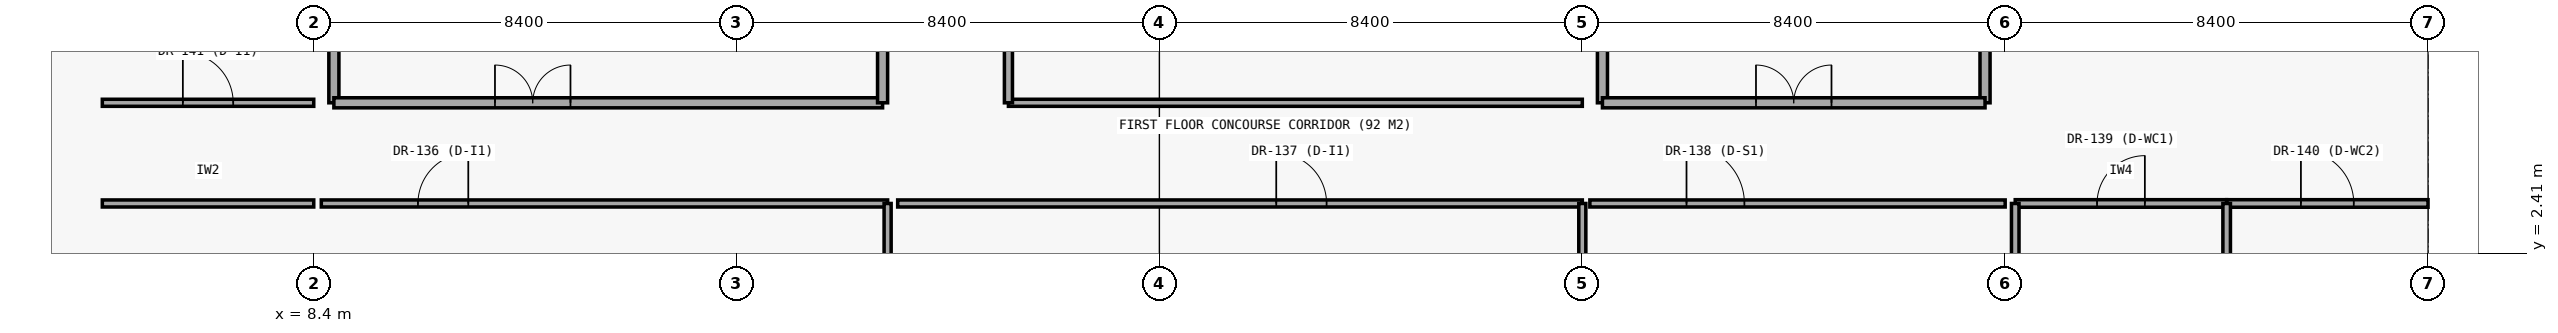
"""IFC4 building model, lengths in metres.
Left out: names, types, materials, properties, quantities, classifications, styles, units other than length and angle.
Written with IfcOpenShell. Run it as: python <this file> out.ifc"""

import sys

from ifc_helpers import new_model, si_unit, direction, frame, frame_2d, origin, place, context, subcontext, project, spatial, rectangle, extrude, element, fill, save


model = new_model("IFC4")
c1 = context("Model", 3, precision=1e-05, world=origin(), true_north=direction((0.0, 1.0)))
c2 = subcontext(c1, "Body", "Model", "MODEL_VIEW")
j1 = project(units=[si_unit("LENGTHUNIT", "METRE"), si_unit("PLANEANGLEUNIT", "RADIAN")], contexts=[c1])
p1 = place(None, origin())
s1 = spatial("IfcSite", under=j1, at=p1, CompositionType="ELEMENT")
p2 = place(p1, origin())
s2 = spatial("IfcBuilding", under=s1, at=p2, CompositionType="ELEMENT")
p3 = place(p2, frame((0.0, 0.0, 4.8)))
s3 = spatial("IfcBuildingStorey", under=s2, at=p3, CompositionType="ELEMENT", Elevation=4.8)
p4 = place(p3, frame((0.0, 4.2, 0.0), z_axis=(0.0, 0.0, 1.0), x_axis=(0.707106781187, -0.707106781187, 0.0)))
e1 = element("IfcWall", 1, at=p4, inside=s3, PredefinedType="STANDARD", context=c2, shape_type="SweptSolid", body=[
    extrude(rectangle(XDim=5.94, YDim=0.36, at=frame_2d((2.97, 0.0))), origin(), (0.0, 0.0, 1.0), 3.62),
])
p5 = place(p4, frame((2.5, 0.0, 1.0)))
e2 = element("IfcOpeningElement", 2, at=p5, cuts=e1, PredefinedType="OPENING", context=c2, shape_type="SweptSolid", body=[
    extrude(rectangle(XDim=0.75, YDim=1.5, at=frame_2d((0.375, 0.75))), frame((0.0, 0.19, 0.0), z_axis=(0.0, -1.0, 0.0), x_axis=(1.0, 0.0, 0.0)), (0.0, 0.0, 1.0), 0.38),
])
p6 = place(p3, frame((8.8, 5.4, 0.0), z_axis=(0.0, 0.0, 1.0), x_axis=(0.0, 1.0, 0.0)))
e3 = element("IfcWall", 3, at=p6, inside=s3, PredefinedType="PARTITIONING", context=c2, shape_type="SweptSolid", body=[
    extrude(rectangle(XDim=2.85, YDim=0.2, at=frame_2d((1.425, 0.0))), origin(), (0.0, 0.0, 1.0), 3.52),
])
p7 = place(p3, frame((8.8, 5.4, 0.0), z_axis=(0.0, 0.0, 1.0), x_axis=(1.0, 0.0, 0.0)))
e4 = element("IfcWall", 4, at=p7, inside=s3, PredefinedType="PARTITIONING", context=c2, shape_type="SweptSolid", body=[
    extrude(rectangle(XDim=10.9, YDim=0.2, at=frame_2d((5.45, 0.0))), origin(), (0.0, 0.0, 1.0), 3.52),
])
p8 = place(p7, frame((3.2, 0.0, 0.0)))
e5 = element("IfcOpeningElement", 5, at=p8, cuts=e4, PredefinedType="OPENING", context=c2, shape_type="SweptSolid", body=[
    extrude(rectangle(XDim=1.5, YDim=2.2, at=frame_2d((0.75, 1.1))), frame((0.0, 0.11, 0.0), z_axis=(0.0, -1.0, 0.0), x_axis=(1.0, 0.0, 0.0)), (0.0, 0.0, 1.0), 0.22),
])
p9 = place(p3, frame((19.7, 5.4, 0.0), z_axis=(0.0, 0.0, 1.0), x_axis=(0.0, 1.0, 0.0)))
e6 = element("IfcWall", 6, at=p9, inside=s3, PredefinedType="PARTITIONING", context=c2, shape_type="SweptSolid", body=[
    extrude(rectangle(XDim=9.6, YDim=0.2, at=frame_2d((4.8, 0.0))), origin(), (0.0, 0.0, 1.0), 3.52),
])
for number, where, z_axis, x_axis in (
    (7, (34.0, 5.4, 0.0), (0.0, 0.0, 1.0), (0.0, 1.0, 0.0)),
    (8, (41.6, 5.4, 0.0), (0.0, 0.0, 1.0), (0.0, 1.0, 0.0)),
):
    element("IfcWall", number, at=place(p3, frame(where, z_axis=z_axis, x_axis=x_axis)), inside=s3, PredefinedType="PARTITIONING", context=c2, shape_type="SweptSolid", body=[
        extrude(rectangle(XDim=2.85, YDim=0.2, at=frame_2d((1.425, 0.0))), origin(), (0.0, 0.0, 1.0), 3.49),
    ])
p10 = place(p3, frame((34.0, 5.4, 0.0), z_axis=(0.0, 0.0, 1.0), x_axis=(1.0, 0.0, 0.0)))
e9 = element("IfcWall", 9, at=p10, inside=s3, PredefinedType="PARTITIONING", context=c2, shape_type="SweptSolid", body=[
    extrude(rectangle(XDim=7.6, YDim=0.2, at=frame_2d((3.8, 0.0))), origin(), (0.0, 0.0, 1.0), 3.52),
])
p11 = place(p10, frame((3.05, 0.0, 0.0)))
e10 = element("IfcOpeningElement", 10, at=p11, cuts=e9, PredefinedType="OPENING", context=c2, shape_type="SweptSolid", body=[
    extrude(rectangle(XDim=1.5, YDim=2.2, at=frame_2d((0.75, 1.1))), frame((0.0, 0.11, 0.0), z_axis=(0.0, -1.0, 0.0), x_axis=(1.0, 0.0, 0.0)), (0.0, 0.0, 1.0), 0.22),
])
p12 = place(p3, frame((4.2, 3.4, 0.0), z_axis=(0.0, 0.0, 1.0), x_axis=(1.0, 0.0, 0.0)))
e11 = element("IfcWall", 11, at=p12, inside=s3, PredefinedType="PARTITIONING", context=c2, shape_type="SweptSolid", body=[
    extrude(rectangle(XDim=4.2, YDim=0.14, at=frame_2d((2.1, 0.0))), origin(), (0.0, 0.0, 1.0), 3.5),
])
p13 = place(p3, frame((8.55, 3.4, 0.0), z_axis=(0.0, 0.0, 1.0), x_axis=(1.0, 0.0, 0.0)))
e12 = element("IfcWall", 12, at=p13, inside=s3, PredefinedType="PARTITIONING", context=c2, shape_type="SweptSolid", body=[
    extrude(rectangle(XDim=11.25, YDim=0.14, at=frame_2d((5.625, 0.0))), origin(), (0.0, 0.0, 1.0), 3.5),
])
p14 = place(p13, frame((1.92, 0.0, 0.0)))
e13 = element("IfcOpeningElement", 13, at=p14, cuts=e12, PredefinedType="OPENING", context=c2, shape_type="SweptSolid", body=[
    extrude(rectangle(XDim=1.0, YDim=2.15, at=frame_2d((0.5, 1.075))), frame((0.0, 0.08, 0.0), z_axis=(0.0, -1.0, 0.0), x_axis=(1.0, 0.0, 0.0)), (0.0, 0.0, 1.0), 0.16),
])
p15 = place(p3, frame((20.0, 3.4, 0.0), z_axis=(0.0, 0.0, 1.0), x_axis=(1.0, 0.0, 0.0)))
e14 = element("IfcWall", 14, at=p15, inside=s3, PredefinedType="PARTITIONING", context=c2, shape_type="SweptSolid", body=[
    extrude(rectangle(XDim=13.6, YDim=0.14, at=frame_2d((6.8, 0.0))), origin(), (0.0, 0.0, 1.0), 3.5),
])
p16 = place(p15, frame((7.52, 0.0, 0.0)))
e15 = element("IfcOpeningElement", 15, at=p16, cuts=e14, PredefinedType="OPENING", context=c2, shape_type="SweptSolid", body=[
    extrude(rectangle(XDim=1.0, YDim=2.15, at=frame_2d((0.5, 1.075))), frame((0.0, 0.08, 0.0), z_axis=(0.0, -1.0, 0.0), x_axis=(1.0, 0.0, 0.0)), (0.0, 0.0, 1.0), 0.16),
])
p17 = place(p3, frame((33.75, 3.4, 0.0), z_axis=(0.0, 0.0, 1.0), x_axis=(1.0, 0.0, 0.0)))
e16 = element("IfcWall", 16, at=p17, inside=s3, PredefinedType="PARTITIONING", context=c2, shape_type="SweptSolid", body=[
    extrude(rectangle(XDim=8.25, YDim=0.14, at=frame_2d((4.125, 0.0))), origin(), (0.0, 0.0, 1.0), 3.5),
])
p18 = place(p17, frame((1.92, 0.0, 0.0)))
e17 = element("IfcOpeningElement", 17, at=p18, cuts=e16, PredefinedType="OPENING", context=c2, shape_type="SweptSolid", body=[
    extrude(rectangle(XDim=1.15, YDim=2.15, at=frame_2d((0.575, 1.075))), frame((0.0, 0.08, 0.0), z_axis=(0.0, -1.0, 0.0), x_axis=(1.0, 0.0, 0.0)), (0.0, 0.0, 1.0), 0.16),
])
p19 = place(p3, frame((42.2, 3.4, 0.0), z_axis=(0.0, 0.0, 1.0), x_axis=(1.0, 0.0, 0.0)))
e18 = element("IfcWall", 18, at=p19, inside=s3, PredefinedType="PARTITIONING", context=c2, shape_type="SweptSolid", body=[
    extrude(rectangle(XDim=4.2, YDim=0.15, at=frame_2d((2.1, 0.0))), origin(), (0.0, 0.0, 1.0), 3.5),
])
p20 = place(p19, frame((1.625, 0.0, 0.0)))
e19 = element("IfcOpeningElement", 19, at=p20, cuts=e18, PredefinedType="OPENING", context=c2, shape_type="SweptSolid", body=[
    extrude(rectangle(XDim=0.95, YDim=2.1, at=frame_2d((0.475, 1.05))), frame((0.0, 0.085, 0.0), z_axis=(0.0, -1.0, 0.0), x_axis=(1.0, 0.0, 0.0)), (0.0, 0.0, 1.0), 0.17),
])
p21 = place(p3, frame((46.4, 3.4, 0.0), z_axis=(0.0, 0.0, 1.0), x_axis=(1.0, 0.0, 0.0)))
e20 = element("IfcWall", 20, at=p21, inside=s3, PredefinedType="PARTITIONING", context=c2, shape_type="SweptSolid", body=[
    extrude(rectangle(XDim=4.0, YDim=0.15, at=frame_2d((2.0, 0.0))), origin(), (0.0, 0.0, 1.0), 3.5),
])
p22 = place(p21, frame((1.475, 0.0, 0.0)))
e21 = element("IfcOpeningElement", 21, at=p22, cuts=e20, PredefinedType="OPENING", context=c2, shape_type="SweptSolid", body=[
    extrude(rectangle(XDim=1.05, YDim=2.15, at=frame_2d((0.525, 1.075))), frame((0.0, 0.085, 0.0), z_axis=(0.0, -1.0, 0.0), x_axis=(1.0, 0.0, 0.0)), (0.0, 0.0, 1.0), 0.17),
])
p23 = place(p3, frame((4.2, 5.4, 0.0), z_axis=(0.0, 0.0, 1.0), x_axis=(1.0, 0.0, 0.0)))
e22 = element("IfcWall", 22, at=p23, inside=s3, PredefinedType="PARTITIONING", context=c2, shape_type="SweptSolid", body=[
    extrude(rectangle(XDim=4.2, YDim=0.14, at=frame_2d((2.1, 0.0))), origin(), (0.0, 0.0, 1.0), 3.5),
])
p24 = place(p23, frame((1.6, 0.0, 0.0)))
e23 = element("IfcOpeningElement", 23, at=p24, cuts=e22, PredefinedType="OPENING", context=c2, shape_type="SweptSolid", body=[
    extrude(rectangle(XDim=1.0, YDim=2.15, at=frame_2d((0.5, 1.075))), frame((0.0, 0.08, 0.0), z_axis=(0.0, -1.0, 0.0), x_axis=(1.0, 0.0, 0.0)), (0.0, 0.0, 1.0), 0.16),
])
p25 = place(p3, frame((22.2, 5.4, 0.0), z_axis=(0.0, 0.0, 1.0), x_axis=(1.0, 0.0, 0.0)))
e24 = element("IfcWall", 24, at=p25, inside=s3, PredefinedType="PARTITIONING", context=c2, shape_type="SweptSolid", body=[
    extrude(rectangle(XDim=11.4, YDim=0.14, at=frame_2d((5.7, 0.0))), origin(), (0.0, 0.0, 1.0), 3.5),
])
p26 = place(p3, frame((19.8, 0.045, 0.0), z_axis=(0.0, 0.0, 1.0), x_axis=(0.0, 1.0, 0.0)))
e25 = element("IfcWall", 25, at=p26, inside=s3, PredefinedType="PARTITIONING", context=c2, shape_type="SweptSolid", body=[
    extrude(rectangle(XDim=3.355, YDim=0.14, at=frame_2d((1.677, 0.0))), origin(), (0.0, 0.0, 1.0), 3.5),
])
p27 = place(p3, frame((22.2, 5.4, 0.0), z_axis=(0.0, 0.0, 1.0), x_axis=(0.0, 1.0, 0.0)))
e26 = element("IfcWall", 26, at=p27, inside=s3, PredefinedType="PARTITIONING", context=c2, shape_type="SweptSolid", body=[
    extrude(rectangle(XDim=16.6, YDim=0.16, at=frame_2d((8.3, 0.0))), origin(), (0.0, 0.0, 1.0), 3.5),
])
p28 = place(p27, frame((13.12, 0.0, 0.0)))
e27 = element("IfcOpeningElement", 27, at=p28, cuts=e26, PredefinedType="OPENING", context=c2, shape_type="SweptSolid", body=[
    extrude(rectangle(XDim=1.0, YDim=2.15, at=frame_2d((0.5, 1.075))), frame((0.0, 0.09, 0.0), z_axis=(0.0, -1.0, 0.0), x_axis=(1.0, 0.0, 0.0)), (0.0, 0.0, 1.0), 0.18),
])
p29 = place(p3, frame((33.6, 0.185, 0.0), z_axis=(0.0, 0.0, 1.0), x_axis=(0.0, 1.0, 0.0)))
e28 = element("IfcWall", 28, at=p29, inside=s3, PredefinedType="PARTITIONING", context=c2, shape_type="SweptSolid", body=[
    extrude(rectangle(XDim=3.215, YDim=0.14, at=frame_2d((1.607, 0.0))), origin(), (0.0, 0.0, 1.0), 3.49),
])
p30 = place(p3, frame((42.2, 0.185, 0.0), z_axis=(0.0, 0.0, 1.0), x_axis=(0.0, 1.0, 0.0)))
e29 = element("IfcWall", 29, at=p30, inside=s3, PredefinedType="PARTITIONING", context=c2, shape_type="SweptSolid", body=[
    extrude(rectangle(XDim=3.215, YDim=0.15, at=frame_2d((1.607, 0.0))), origin(), (0.0, 0.0, 1.0), 3.49),
])
p31 = place(p3, frame((46.4, 0.185, 0.0), z_axis=(0.0, 0.0, 1.0), x_axis=(0.0, 1.0, 0.0)))
e30 = element("IfcWall", 30, at=p31, inside=s3, PredefinedType="PARTITIONING", context=c2, shape_type="SweptSolid", body=[
    extrude(rectangle(XDim=3.215, YDim=0.15, at=frame_2d((1.607, 0.0))), origin(), (0.0, 0.0, 1.0), 3.5),
])
p32 = place(p8, origin())
e31 = element("IfcDoor", 31, at=p32, inside=s3, OperationType="DOUBLE_DOOR_SINGLE_SWING", PredefinedType="DOOR", context=c2, shape_type="SweptSolid", body=[
    extrude(rectangle(XDim=1.5, YDim=2.2, at=frame_2d((0.75, 1.1))), frame((0.0, 0.025, 0.0), z_axis=(0.0, -1.0, 0.0), x_axis=(1.0, 0.0, 0.0)), (0.0, 0.0, 1.0), 0.05),
])
fill(e5, e31)
p33 = place(p11, origin())
e32 = element("IfcDoor", 32, at=p33, inside=s3, OperationType="DOUBLE_DOOR_SINGLE_SWING", PredefinedType="DOOR", context=c2, shape_type="SweptSolid", body=[
    extrude(rectangle(XDim=1.5, YDim=2.2, at=frame_2d((0.75, 1.1))), frame((0.0, 0.025, 0.0), z_axis=(0.0, -1.0, 0.0), x_axis=(1.0, 0.0, 0.0)), (0.0, 0.0, 1.0), 0.05),
])
fill(e10, e32)
p34 = place(p14, origin())
e33 = element("IfcDoor", 33, at=p34, inside=s3, OperationType="SINGLE_SWING_RIGHT", PredefinedType="DOOR", context=c2, shape_type="SweptSolid", body=[
    extrude(rectangle(XDim=1.0, YDim=2.15, at=frame_2d((0.5, 1.075))), frame((0.0, 0.025, 0.0), z_axis=(0.0, -1.0, 0.0), x_axis=(1.0, 0.0, 0.0)), (0.0, 0.0, 1.0), 0.05),
])
fill(e13, e33)
p35 = place(p16, origin())
e34 = element("IfcDoor", 34, at=p35, inside=s3, OperationType="SINGLE_SWING_LEFT", PredefinedType="DOOR", context=c2, shape_type="SweptSolid", body=[
    extrude(rectangle(XDim=1.0, YDim=2.15, at=frame_2d((0.5, 1.075))), frame((0.0, 0.025, 0.0), z_axis=(0.0, -1.0, 0.0), x_axis=(1.0, 0.0, 0.0)), (0.0, 0.0, 1.0), 0.05),
])
fill(e15, e34)
p36 = place(p18, origin())
e35 = element("IfcDoor", 35, at=p36, inside=s3, OperationType="SINGLE_SWING_LEFT", PredefinedType="DOOR", context=c2, shape_type="SweptSolid", body=[
    extrude(rectangle(XDim=1.15, YDim=2.15, at=frame_2d((0.575, 1.075))), frame((0.0, 0.025, 0.0), z_axis=(0.0, -1.0, 0.0), x_axis=(1.0, 0.0, 0.0)), (0.0, 0.0, 1.0), 0.05),
])
fill(e17, e35)
p37 = place(p20, origin())
e36 = element("IfcDoor", 36, at=p37, inside=s3, OperationType="SINGLE_SWING_RIGHT", PredefinedType="DOOR", context=c2, shape_type="SweptSolid", body=[
    extrude(rectangle(XDim=0.95, YDim=2.1, at=frame_2d((0.475, 1.05))), frame((0.0, 0.025, 0.0), z_axis=(0.0, -1.0, 0.0), x_axis=(1.0, 0.0, 0.0)), (0.0, 0.0, 1.0), 0.05),
])
fill(e19, e36)
p38 = place(p22, origin())
e37 = element("IfcDoor", 37, at=p38, inside=s3, OperationType="SINGLE_SWING_LEFT", PredefinedType="DOOR", context=c2, shape_type="SweptSolid", body=[
    extrude(rectangle(XDim=1.05, YDim=2.15, at=frame_2d((0.525, 1.075))), frame((0.0, 0.025, 0.0), z_axis=(0.0, -1.0, 0.0), x_axis=(1.0, 0.0, 0.0)), (0.0, 0.0, 1.0), 0.05),
])
fill(e21, e37)
p39 = place(p24, origin())
e38 = element("IfcDoor", 38, at=p39, inside=s3, OperationType="SINGLE_SWING_LEFT", PredefinedType="DOOR", context=c2, shape_type="SweptSolid", body=[
    extrude(rectangle(XDim=1.0, YDim=2.15, at=frame_2d((0.5, 1.075))), frame((0.0, 0.025, 0.0), z_axis=(0.0, -1.0, 0.0), x_axis=(1.0, 0.0, 0.0)), (0.0, 0.0, 1.0), 0.05),
])
fill(e23, e38)
save(model, sys.argv[1])
